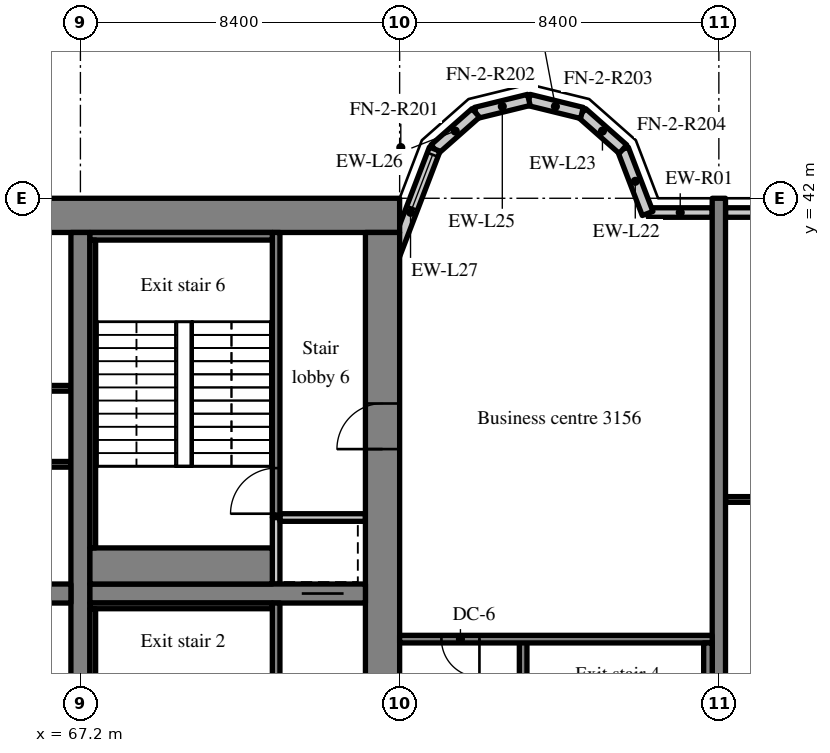
"""IFC4 building model, lengths in metres.
Left out: names, types, materials, properties, quantities, classifications, styles, units other than length and angle.
Written with IfcOpenShell. Run it as: python <this file> out.ifc"""

import sys

from ifc_helpers import new_model, si_unit, direction, frame, frame_2d, origin, place, context, subcontext, project, spatial, rectangle, extrude, source, transform, mapped, element, fill, save


model = new_model("IFC4")
c1 = context("Model", 3, precision=1e-05, world=origin(), true_north=direction((0.0, 1.0)))
c2 = subcontext(c1, "Body", "Model", "MODEL_VIEW")
j1 = project(units=[si_unit("LENGTHUNIT", "METRE"), si_unit("PLANEANGLEUNIT", "RADIAN")], contexts=[c1])
p1 = place(None, origin())
s1 = spatial("IfcSite", under=j1, at=p1, CompositionType="ELEMENT")
p2 = place(p1, origin())
s2 = spatial("IfcBuilding", under=s1, at=p2, CompositionType="ELEMENT")
p3 = place(p2, frame((0.0, 0.0, 129.4)))
s3 = spatial("IfcBuildingStorey", under=s2, at=p3, CompositionType="ELEMENT", Elevation=129.4)
m1 = source(origin(), c2, "Body", "SweptSolid", [
    extrude(rectangle(XDim=50.4, YDim=0.9, at=frame_2d((25.2, 0.0))), origin(), (0.0, 0.0, 1.0), 3.52),
])
p4 = place(p3, frame((25.2, 41.55, 0.0), z_axis=(0.0, 0.0, 1.0), x_axis=(1.0, 0.0, 0.0)))
e1 = element("IfcWall", 1, at=p4, inside=s3, PredefinedType="SHEAR", context=c2, shape_type="MappedRepresentation", body=[
    mapped(m1, transform((0.0, 0.0, 0.0), scale=1.0)),
])
m2 = source(origin(), c2, "Body", "SweptSolid", [
    extrude(rectangle(XDim=18.2, YDim=0.9, at=frame_2d((9.1, 0.0))), origin(), (0.0, 0.0, 1.0), 3.52),
])
p5 = place(p3, frame((75.15, 22.9, 0.0), z_axis=(0.0, 0.0, 1.0), x_axis=(0.0, 1.0, 0.0)))
e2 = element("IfcWall", 2, at=p5, inside=s3, PredefinedType="SHEAR", context=c2, shape_type="MappedRepresentation", body=[
    mapped(m2, transform((0.0, 0.0, 0.0), scale=1.0)),
])
m3 = source(origin(), c2, "Body", "SweptSolid", [
    extrude(rectangle(XDim=1.2, YDim=2.1, at=frame_2d((0.6, 1.05))), frame((0.0, 0.46, 0.0), z_axis=(0.0, -1.0, 0.0), x_axis=(1.0, 0.0, 0.0)), (0.0, 0.0, 1.0), 0.92),
])
p6 = place(p5, frame((12.5, 0.0, 0.0)))
e3 = element("IfcOpeningElement", 3, at=p6, cuts=e2, PredefinedType="OPENING", context=c2, shape_type="MappedRepresentation", body=[
    mapped(m3, transform((0.0, 0.0, 0.0), scale=1.0)),
])
m4 = source(origin(), c2, "Body", "SweptSolid", [
    extrude(rectangle(XDim=18.2, YDim=0.5, at=frame_2d((9.1, 0.0))), origin(), (0.0, 0.0, 1.0), 3.52),
])
p7 = place(p3, frame((67.2, 22.9, 0.0), z_axis=(0.0, 0.0, 1.0), x_axis=(0.0, 1.0, 0.0)))
e4 = element("IfcWall", 4, at=p7, inside=s3, PredefinedType="SHEAR", context=c2, shape_type="MappedRepresentation", body=[
    mapped(m4, transform((0.0, 0.0, 0.0), scale=1.0)),
])
m5 = source(origin(), c2, "Body", "SweptSolid", [
    extrude(rectangle(XDim=16.3, YDim=0.5, at=frame_2d((8.15, 0.0))), origin(), (0.0, 0.0, 1.0), 3.52),
])
p8 = place(p3, frame((50.65, 31.6, 0.0), z_axis=(0.0, 0.0, 1.0), x_axis=(1.0, 0.0, 0.0)))
e5 = element("IfcWall", 5, at=p8, inside=s3, PredefinedType="SHEAR", context=c2, shape_type="MappedRepresentation", body=[
    mapped(m5, transform((0.0, 0.0, 0.0), scale=1.0)),
])
m6 = source(origin(), c2, "Body", "SweptSolid", [
    extrude(rectangle(XDim=1.0, YDim=2.1, at=frame_2d((0.5, 1.05))), frame((0.0, 0.26, 0.0), z_axis=(0.0, -1.0, 0.0), x_axis=(1.0, 0.0, 0.0)), (0.0, 0.0, 1.0), 0.52),
])
p9 = place(p8, frame((0.575, 0.0, 0.0)))
e6 = element("IfcOpeningElement", 6, at=p9, cuts=e5, PredefinedType="OPENING", context=c2, shape_type="MappedRepresentation", body=[
    mapped(m6, transform((0.0, 0.0, 0.0), scale=1.0)),
])
m7 = source(origin(), c2, "Body", "SweptSolid", [
    extrude(rectangle(XDim=7.25, YDim=0.5, at=frame_2d((3.625, 0.0))), origin(), (0.0, 0.0, 1.0), 3.52),
])
p10 = place(p3, frame((67.45, 31.6, 0.0), z_axis=(0.0, 0.0, 1.0), x_axis=(1.0, 0.0, 0.0)))
e7 = element("IfcWall", 7, at=p10, inside=s3, PredefinedType="SHEAR", context=c2, shape_type="MappedRepresentation", body=[
    mapped(m7, transform((0.0, 0.0, 0.0), scale=1.0)),
])
m8 = source(origin(), c2, "Body", "SweptSolid", [
    extrude(rectangle(XDim=1.1, YDim=2.1, at=frame_2d((0.55, 1.05))), frame((0.0, 0.26, 0.0), z_axis=(0.0, -1.0, 0.0), x_axis=(1.0, 0.0, 0.0)), (0.0, 0.0, 1.0), 0.52),
])
p11 = place(p10, frame((5.575, 0.0, 0.0)))
e8 = element("IfcOpeningElement", 8, at=p11, cuts=e7, PredefinedType="OPENING", context=c2, shape_type="MappedRepresentation", body=[
    mapped(m8, transform((0.0, 0.0, 0.0), scale=1.0)),
])
m9 = source(origin(), c2, "Body", "SweptSolid", [
    extrude(rectangle(XDim=20.0, YDim=0.35, at=frame_2d((10.0, 0.0))), origin(), (0.0, 0.0, 1.0), 3.52),
])
p12 = place(p3, frame((84.0, 22.0, 0.0), z_axis=(0.0, 0.0, 1.0), x_axis=(0.0, 1.0, 0.0)))
e9 = element("IfcWall", 9, at=p12, inside=s3, PredefinedType="SHEAR", context=c2, shape_type="MappedRepresentation", body=[
    mapped(m9, transform((0.0, 0.0, 0.0), scale=1.0)),
])
m10 = source(origin(), c2, "Body", "SweptSolid", [
    extrude(rectangle(XDim=1.683, YDim=0.25, at=frame_2d((0.841, 0.0))), origin(), (0.0, 0.0, 1.0), 2.82),
])
p13 = place(p3, frame((83.825, 41.625, 0.0), z_axis=(0.0, 0.0, 1.0), x_axis=(-1.0, 0.0, 0.0)))
e10 = element("IfcWall", 10, at=p13, inside=s3, PredefinedType="SOLIDWALL", context=c2, shape_type="MappedRepresentation", body=[
    mapped(m10, transform((0.0, 0.0, 0.0), scale=1.0)),
])
m11 = source(origin(), c2, "Body", "SweptSolid", [
    extrude(rectangle(XDim=3.675, YDim=0.25, at=frame_2d((1.837, 0.0))), origin(), (0.0, 0.0, 1.0), 2.82),
])
p14 = place(p3, frame((87.85, 41.625, 0.0), z_axis=(0.0, 0.0, 1.0), x_axis=(-1.0, 0.0, 0.0)))
e11 = element("IfcWall", 11, at=p14, inside=s3, PredefinedType="SOLIDWALL", context=c2, shape_type="MappedRepresentation", body=[
    mapped(m11, transform((0.0, 0.0, 0.0), scale=1.0)),
])
m12 = source(origin(), c2, "Body", "SweptSolid", [
    extrude(rectangle(XDim=1.5, YDim=1.5, at=frame_2d((0.75, 0.75))), frame((0.0, 0.135, 0.0), z_axis=(0.0, -1.0, 0.0), x_axis=(1.0, 0.0, 0.0)), (0.0, 0.0, 1.0), 0.27),
])
p15 = place(p14, frame((1.087, 0.0, 0.9)))
e12 = element("IfcOpeningElement", 12, at=p15, cuts=e11, PredefinedType="OPENING", context=c2, shape_type="MappedRepresentation", body=[
    mapped(m12, transform((0.0, 0.0, 0.0), scale=1.0)),
])
m13 = source(origin(), c2, "Body", "SweptSolid", [
    extrude(rectangle(XDim=1.812, YDim=0.3, at=frame_2d((0.906, 0.0))), origin(), (0.0, 0.0, 1.0), 3.52),
])
p16 = place(p3, frame((82.125, 41.6, 0.0), z_axis=(0.0, 0.0, 1.0), x_axis=(-0.357877270961, 0.93376863244, 0.0)))
e13 = element("IfcWall", 13, at=p16, inside=s3, PredefinedType="SOLIDWALL", context=c2, shape_type="MappedRepresentation", body=[
    mapped(m13, transform((0.0, 0.0, 0.0), scale=1.0)),
])
m14 = source(origin(), c2, "Body", "SweptSolid", [
    extrude(rectangle(XDim=1.44, YDim=0.3, at=frame_2d((0.72, 0.0))), origin(), (0.0, 0.0, 1.0), 3.52),
])
p17 = place(p3, frame((81.477, 43.292, 0.0), z_axis=(0.0, 0.0, 1.0), x_axis=(-0.74957555648, 0.661918790432, 0.0)))
e14 = element("IfcWall", 14, at=p17, inside=s3, PredefinedType="SOLIDWALL", context=c2, shape_type="MappedRepresentation", body=[
    mapped(m14, transform((0.0, 0.0, 0.0), scale=1.0)),
])
m15 = source(origin(), c2, "Body", "SweptSolid", [
    extrude(rectangle(XDim=1.439, YDim=0.3, at=frame_2d((0.719, 0.0))), origin(), (0.0, 0.0, 1.0), 3.52),
])
for number, where, z_axis, x_axis in (
    (15, (80.397, 44.245, 0.0), (0.0, 0.0, 1.0), (-0.971, 0.238, 0.0)),
    (16, (79.0, 44.588, 0.0), (0.0, 0.0, 1.0), (-0.971, -0.238, 0.0)),
):
    element("IfcWall", number, at=place(p3, frame(where, z_axis=z_axis, x_axis=x_axis)), inside=s3, PredefinedType="SOLIDWALL", context=c2, shape_type="MappedRepresentation", body=[
        mapped(m15, transform((0.0, 0.0, 0.0), scale=1.0)),
    ])
p18 = place(p3, frame((77.603, 44.245, 0.0), z_axis=(0.0, 0.0, 1.0), x_axis=(-0.74957555648, -0.661918790432, 0.0)))
e17 = element("IfcWall", 17, at=p18, inside=s3, PredefinedType="SOLIDWALL", context=c2, shape_type="MappedRepresentation", body=[
    mapped(m14, transform((0.0, 0.0, 0.0), scale=1.0)),
])
m16 = source(origin(), c2, "Body", "SweptSolid", [
    extrude(rectangle(XDim=3.559, YDim=0.3, at=frame_2d((1.78, 0.0))), origin(), (0.0, 0.0, 1.0), 3.52),
])
p19 = place(p3, frame((76.523, 43.292, 0.0), z_axis=(0.0, 0.0, 1.0), x_axis=(-0.35779745313, -0.933799219604, 0.0)))
e18 = element("IfcWall", 18, at=p19, inside=s3, PredefinedType="SOLIDWALL", context=c2, shape_type="MappedRepresentation", body=[
    mapped(m16, transform((0.0, 0.0, 0.0), scale=1.0)),
])
m17 = source(origin(), c2, "Body", "SweptSolid", [
    extrude(rectangle(XDim=1.5, YDim=2.0, at=frame_2d((0.75, 1.0))), frame((0.0, 0.16, 0.0), z_axis=(0.0, -1.0, 0.0), x_axis=(1.0, 0.0, 0.0)), (0.0, 0.0, 1.0), 0.32),
])
p20 = place(p19, frame((0.156, 0.0, 0.9)))
e19 = element("IfcOpeningElement", 19, at=p20, cuts=e18, PredefinedType="OPENING", context=c2, shape_type="MappedRepresentation", body=[
    mapped(m17, transform((0.0, 0.0, 0.0), scale=1.0)),
])
m18 = source(origin(), c2, "Body", "SweptSolid", [
    extrude(rectangle(XDim=14.15, YDim=0.15, at=frame_2d((7.075, 0.0))), origin(), (0.0, 0.0, 1.0), 3.52),
])
p21 = place(p3, frame((66.95, 35.0, 0.0), z_axis=(0.0, 0.0, 1.0), x_axis=(-1.0, 0.0, 0.0)))
e20 = element("IfcWall", 20, at=p21, inside=s3, PredefinedType="PARTITIONING", context=c2, shape_type="MappedRepresentation", body=[
    mapped(m18, transform((0.0, 0.0, 0.0), scale=1.0)),
])
m19 = source(origin(), c2, "Body", "SweptSolid", [
    extrude(rectangle(XDim=0.9, YDim=2.1, at=frame_2d((0.45, 1.05))), frame((0.0, 0.085, 0.0), z_axis=(0.0, -1.0, 0.0), x_axis=(1.0, 0.0, 0.0)), (0.0, 0.0, 1.0), 0.17),
])
p22 = place(p21, frame((3.421, 0.0, 0.0)))
e21 = element("IfcOpeningElement", 21, at=p22, cuts=e20, PredefinedType="OPENING", context=c2, shape_type="MappedRepresentation", body=[
    mapped(m19, transform((0.0, 0.0, 0.0), scale=1.0)),
])
p23 = place(p21, frame((10.458, 0.0, 0.0)))
e22 = element("IfcOpeningElement", 22, at=p23, cuts=e20, PredefinedType="OPENING", context=c2, shape_type="MappedRepresentation", body=[
    mapped(m19, transform((0.0, 0.0, 0.0), scale=1.0)),
])
m20 = source(origin(), c2, "Body", "SweptSolid", [
    extrude(rectangle(XDim=16.3, YDim=0.15, at=frame_2d((8.15, 0.0))), origin(), (0.0, 0.0, 1.0), 3.52),
])
p24 = place(p3, frame((66.95, 37.0, 0.0), z_axis=(0.0, 0.0, 1.0), x_axis=(-1.0, 0.0, 0.0)))
e23 = element("IfcWall", 23, at=p24, inside=s3, PredefinedType="PARTITIONING", context=c2, shape_type="MappedRepresentation", body=[
    mapped(m20, transform((0.0, 0.0, 0.0), scale=1.0)),
])
p25 = place(p24, frame((6.478, 0.0, 0.0)))
e24 = element("IfcOpeningElement", 24, at=p25, cuts=e23, PredefinedType="OPENING", context=c2, shape_type="MappedRepresentation", body=[
    mapped(m19, transform((0.0, 0.0, 0.0), scale=1.0)),
])
p26 = place(p24, frame((14.627, 0.0, 0.0)))
e25 = element("IfcOpeningElement", 25, at=p26, cuts=e23, PredefinedType="OPENING", context=c2, shape_type="MappedRepresentation", body=[
    mapped(m19, transform((0.0, 0.0, 0.0), scale=1.0)),
])
m21 = source(origin(), c2, "Body", "SweptSolid", [
    extrude(rectangle(XDim=8.45, YDim=0.2, at=frame_2d((4.225, 0.0))), origin(), (0.0, 0.0, 1.0), 3.52),
])
p27 = place(p3, frame((72.35, 22.9, 0.0), z_axis=(0.0, 0.0, 1.0), x_axis=(0.0, 1.0, 0.0)))
e26 = element("IfcWall", 26, at=p27, inside=s3, PredefinedType="SOLIDWALL", context=c2, shape_type="MappedRepresentation", body=[
    mapped(m21, transform((0.0, 0.0, 0.0), scale=1.0)),
])
m22 = source(origin(), c2, "Body", "SweptSolid", [
    extrude(rectangle(XDim=1.2, YDim=2.1, at=frame_2d((0.6, 1.05))), frame((0.0, 0.11, 0.0), z_axis=(0.0, -1.0, 0.0), x_axis=(1.0, 0.0, 0.0)), (0.0, 0.0, 1.0), 0.22),
])
p28 = place(p27, frame((0.7, 0.0, 0.0)))
e27 = element("IfcOpeningElement", 27, at=p28, cuts=e26, PredefinedType="OPENING", context=c2, shape_type="MappedRepresentation", body=[
    mapped(m22, transform((0.0, 0.0, 0.0), scale=1.0)),
])
m23 = source(origin(), c2, "Body", "SweptSolid", [
    extrude(rectangle(XDim=1.75, YDim=0.2, at=frame_2d((0.875, 0.0))), origin(), (0.0, 0.0, 1.0), 3.52),
])
p29 = place(p3, frame((72.35, 31.85, 0.0), z_axis=(0.0, 0.0, 1.0), x_axis=(0.0, 1.0, 0.0)))
e28 = element("IfcWall", 28, at=p29, inside=s3, PredefinedType="SOLIDWALL", context=c2, shape_type="MappedRepresentation", body=[
    mapped(m23, transform((0.0, 0.0, 0.0), scale=1.0)),
])
m24 = source(origin(), c2, "Body", "SweptSolid", [
    extrude(rectangle(XDim=2.25, YDim=0.2, at=frame_2d((1.125, 0.0))), origin(), (0.0, 0.0, 1.0), 3.52),
])
p30 = place(p3, frame((72.45, 33.6, 0.0), z_axis=(0.0, 0.0, 1.0), x_axis=(1.0, 0.0, 0.0)))
e29 = element("IfcWall", 29, at=p30, inside=s3, PredefinedType="SOLIDWALL", context=c2, shape_type="MappedRepresentation", body=[
    mapped(m24, transform((0.0, 0.0, 0.0), scale=1.0)),
])
m25 = source(origin(), c2, "Body", "SweptSolid", [
    extrude(rectangle(XDim=7.5, YDim=0.2, at=frame_2d((3.75, 0.0))), origin(), (0.0, 0.0, 1.0), 3.52),
])
p31 = place(p3, frame((72.35, 33.6, 0.0), z_axis=(0.0, 0.0, 1.0), x_axis=(0.0, 1.0, 0.0)))
e30 = element("IfcWall", 30, at=p31, inside=s3, PredefinedType="SOLIDWALL", context=c2, shape_type="MappedRepresentation", body=[
    mapped(m25, transform((0.0, 0.0, 0.0), scale=1.0)),
])
p32 = place(p31, frame((0.1, 0.0, 0.0)))
e31 = element("IfcOpeningElement", 31, at=p32, cuts=e30, PredefinedType="OPENING", context=c2, shape_type="MappedRepresentation", body=[
    mapped(m22, transform((0.0, 0.0, 0.0), scale=1.0)),
])
m26 = source(origin(), c2, "Body", "SweptSolid", [
    extrude(rectangle(XDim=8.3, YDim=0.2, at=frame_2d((4.15, 0.0))), origin(), (0.0, 0.0, 1.0), 3.52),
])
p33 = place(p3, frame((78.85, 22.1, 0.0), z_axis=(0.0, 0.0, 1.0), x_axis=(0.0, 1.0, 0.0)))
e32 = element("IfcWall", 32, at=p33, inside=s3, PredefinedType="SOLIDWALL", context=c2, shape_type="MappedRepresentation", body=[
    mapped(m26, transform((0.0, 0.0, 0.0), scale=1.0)),
])
p34 = place(p33, frame((0.6, 0.0, 0.0)))
e33 = element("IfcOpeningElement", 33, at=p34, cuts=e32, PredefinedType="OPENING", context=c2, shape_type="MappedRepresentation", body=[
    mapped(m22, transform((0.0, 0.0, 0.0), scale=1.0)),
])
m27 = source(origin(), c2, "Body", "SweptSolid", [
    extrude(rectangle(XDim=8.225, YDim=0.2, at=frame_2d((4.112, 0.0))), origin(), (0.0, 0.0, 1.0), 3.52),
])
p35 = place(p3, frame((83.825, 30.4, 0.0), z_axis=(0.0, 0.0, 1.0), x_axis=(-1.0, 0.0, 0.0)))
e34 = element("IfcWall", 34, at=p35, inside=s3, PredefinedType="SOLIDWALL", context=c2, shape_type="MappedRepresentation", body=[
    mapped(m27, transform((0.0, 0.0, 0.0), scale=1.0)),
])
m28 = source(origin(), c2, "Body", "SweptSolid", [
    extrude(rectangle(XDim=1.0, YDim=2.1, at=frame_2d((0.5, 1.05))), frame((0.0, 0.11, 0.0), z_axis=(0.0, -1.0, 0.0), x_axis=(1.0, 0.0, 0.0)), (0.0, 0.0, 1.0), 0.22),
])
p36 = place(p35, frame((6.125, 0.0, 0.0)))
e35 = element("IfcOpeningElement", 35, at=p36, cuts=e34, PredefinedType="OPENING", context=c2, shape_type="MappedRepresentation", body=[
    mapped(m28, transform((0.0, 0.0, 0.0), scale=1.0)),
])
m29 = source(origin(), c2, "Body", "SweptSolid", [
    extrude(rectangle(XDim=4.8, YDim=0.15, at=frame_2d((2.4, 0.0))), origin(), (0.0, 0.0, 1.0), 3.52),
])
p37 = place(p3, frame((67.45, 31.275, 0.0), z_axis=(0.0, 0.0, 1.0), x_axis=(1.0, 0.0, 0.0)))
e36 = element("IfcWall", 36, at=p37, inside=s3, PredefinedType="SOLIDWALL", context=c2, shape_type="MappedRepresentation", body=[
    mapped(m29, transform((0.0, 0.0, 0.0), scale=1.0)),
])
m30 = source(origin(), c2, "Body", "SweptSolid", [
    extrude(rectangle(XDim=8.1, YDim=0.15, at=frame_2d((4.05, 0.0))), origin(), (0.0, 0.0, 1.0), 3.52),
])
p38 = place(p3, frame((67.525, 23.1, 0.0), z_axis=(0.0, 0.0, 1.0), x_axis=(0.0, 1.0, 0.0)))
e37 = element("IfcWall", 37, at=p38, inside=s3, PredefinedType="SOLIDWALL", context=c2, shape_type="MappedRepresentation", body=[
    mapped(m30, transform((0.0, 0.0, 0.0), scale=1.0)),
])
m31 = source(origin(), c2, "Body", "SweptSolid", [
    extrude(rectangle(XDim=4.8, YDim=0.2, at=frame_2d((2.4, 0.0))), origin(), (0.0, 0.0, 1.0), 3.52),
])
p39 = place(p3, frame((67.45, 41.0, 0.0), z_axis=(0.0, 0.0, 1.0), x_axis=(1.0, 0.0, 0.0)))
e38 = element("IfcWall", 38, at=p39, inside=s3, PredefinedType="SOLIDWALL", context=c2, shape_type="MappedRepresentation", body=[
    mapped(m31, transform((0.0, 0.0, 0.0), scale=1.0)),
])
m32 = source(origin(), c2, "Body", "SweptSolid", [
    extrude(rectangle(XDim=4.8, YDim=0.95, at=frame_2d((2.4, 0.0))), origin(), (0.0, 0.0, 1.0), 3.52),
])
p40 = place(p3, frame((67.45, 32.325, 0.0), z_axis=(0.0, 0.0, 1.0), x_axis=(1.0, 0.0, 0.0)))
e39 = element("IfcWall", 39, at=p40, inside=s3, PredefinedType="SOLIDWALL", context=c2, shape_type="MappedRepresentation", body=[
    mapped(m32, transform((0.0, 0.0, 0.0), scale=1.0)),
])
p41 = place(p3, frame((67.525, 32.8, 0.0), z_axis=(0.0, 0.0, 1.0), x_axis=(0.0, 1.0, 0.0)))
e40 = element("IfcWall", 40, at=p41, inside=s3, PredefinedType="SOLIDWALL", context=c2, shape_type="MappedRepresentation", body=[
    mapped(m30, transform((0.0, 0.0, 0.0), scale=1.0)),
])
m33 = source(origin(), c2, "Body", "SweptSolid", [
    extrude(rectangle(XDim=8.1, YDim=0.225, at=frame_2d((4.05, 0.0))), origin(), (0.0, 0.0, 1.0), 3.52),
])
p42 = place(p3, frame((83.713, 22.2, 0.0), z_axis=(0.0, 0.0, 1.0), x_axis=(0.0, 1.0, 0.0)))
e41 = element("IfcWall", 41, at=p42, inside=s3, PredefinedType="SOLIDWALL", context=c2, shape_type="MappedRepresentation", body=[
    mapped(m33, transform((0.0, 0.0, 0.0), scale=1.0)),
])
m34 = source(origin(), c2, "Body", "SweptSolid", [
    extrude(rectangle(XDim=8.05, YDim=0.15, at=frame_2d((4.025, 0.0))), origin(), (0.0, 0.0, 1.0), 3.52),
])
p43 = place(p3, frame((84.175, 34.075, 0.0), z_axis=(0.0, 0.0, 1.0), x_axis=(1.0, 0.0, 0.0)))
e42 = element("IfcWall", 42, at=p43, inside=s3, PredefinedType="PARTITIONING", context=c2, shape_type="MappedRepresentation", body=[
    mapped(m34, transform((0.0, 0.0, 0.0), scale=1.0)),
])
m35 = source(origin(), c2, "Body", "SweptSolid", [
    extrude(rectangle(XDim=1.0, YDim=2.1, at=frame_2d((0.5, 1.05))), frame((0.0, 0.085, 0.0), z_axis=(0.0, -1.0, 0.0), x_axis=(1.0, 0.0, 0.0)), (0.0, 0.0, 1.0), 0.17),
])
p44 = place(p43, frame((0.7, 0.0, 0.0)))
e43 = element("IfcOpeningElement", 43, at=p44, cuts=e42, PredefinedType="OPENING", context=c2, shape_type="MappedRepresentation", body=[
    mapped(m35, transform((0.0, 0.0, 0.0), scale=1.0)),
])
m36 = source(origin(), c2, "Body", "SweptSolid", [
    extrude(rectangle(XDim=1.5, YDim=2.0, at=frame_2d((0.75, 1.0))), frame((0.0, 0.03, 0.0), z_axis=(0.0, -1.0, 0.0), x_axis=(1.0, 0.0, 0.0)), (0.0, 0.0, 1.0), 0.06),
])
p45 = place(p20, origin())
e44 = element("IfcWindow", 44, at=p45, inside=s3, PartitioningType="SINGLE_PANEL", PredefinedType="WINDOW", context=c2, shape_type="MappedRepresentation", body=[
    mapped(m36, transform((0.0, 0.0, 0.0), scale=1.0)),
])
fill(e19, e44)
m37 = source(origin(), c2, "Body", "SweptSolid", [
    extrude(rectangle(XDim=1.1, YDim=2.1, at=frame_2d((0.55, 1.05))), frame((0.0, 0.025, 0.0), z_axis=(0.0, -1.0, 0.0), x_axis=(1.0, 0.0, 0.0)), (0.0, 0.0, 1.0), 0.05),
])
p46 = place(p11, origin())
e45 = element("IfcDoor", 45, at=p46, inside=s3, OperationType="SLIDING_TO_LEFT", PredefinedType="DOOR", context=c2, shape_type="MappedRepresentation", body=[
    mapped(m37, transform((0.0, 0.0, 0.0), scale=1.0)),
])
fill(e8, e45)
m38 = source(origin(), c2, "Body", "SweptSolid", [
    extrude(rectangle(XDim=1.2, YDim=2.1, at=frame_2d((0.6, 1.05))), frame((0.0, 0.025, 0.0), z_axis=(0.0, -1.0, 0.0), x_axis=(1.0, 0.0, 0.0)), (0.0, 0.0, 1.0), 0.05),
])
p47 = place(p32, origin())
e46 = element("IfcDoor", 46, at=p47, inside=s3, OperationType="SINGLE_SWING_LEFT", PredefinedType="DOOR", context=c2, shape_type="MappedRepresentation", body=[
    mapped(m38, transform((0.0, 0.0, 0.0), scale=1.0)),
])
fill(e31, e46)
p48 = place(p6, origin())
e47 = element("IfcDoor", 47, at=p48, inside=s3, OperationType="SINGLE_SWING_LEFT", PredefinedType="DOOR", context=c2, shape_type="MappedRepresentation", body=[
    mapped(m38, transform((0.0, 0.0, 0.0), scale=1.0)),
])
fill(e3, e47)
m39 = source(origin(), c2, "Body", "SweptSolid", [
    extrude(rectangle(XDim=1.0, YDim=2.1, at=frame_2d((0.5, 1.05))), frame((0.0, 0.025, 0.0), z_axis=(0.0, -1.0, 0.0), x_axis=(1.0, 0.0, 0.0)), (0.0, 0.0, 1.0), 0.05),
])
p49 = place(p36, origin())
e48 = element("IfcDoor", 48, at=p49, inside=s3, OperationType="SINGLE_SWING_LEFT", PredefinedType="DOOR", context=c2, shape_type="MappedRepresentation", body=[
    mapped(m39, transform((0.0, 0.0, 0.0), scale=1.0)),
])
fill(e35, e48)
save(model, sys.argv[1])
